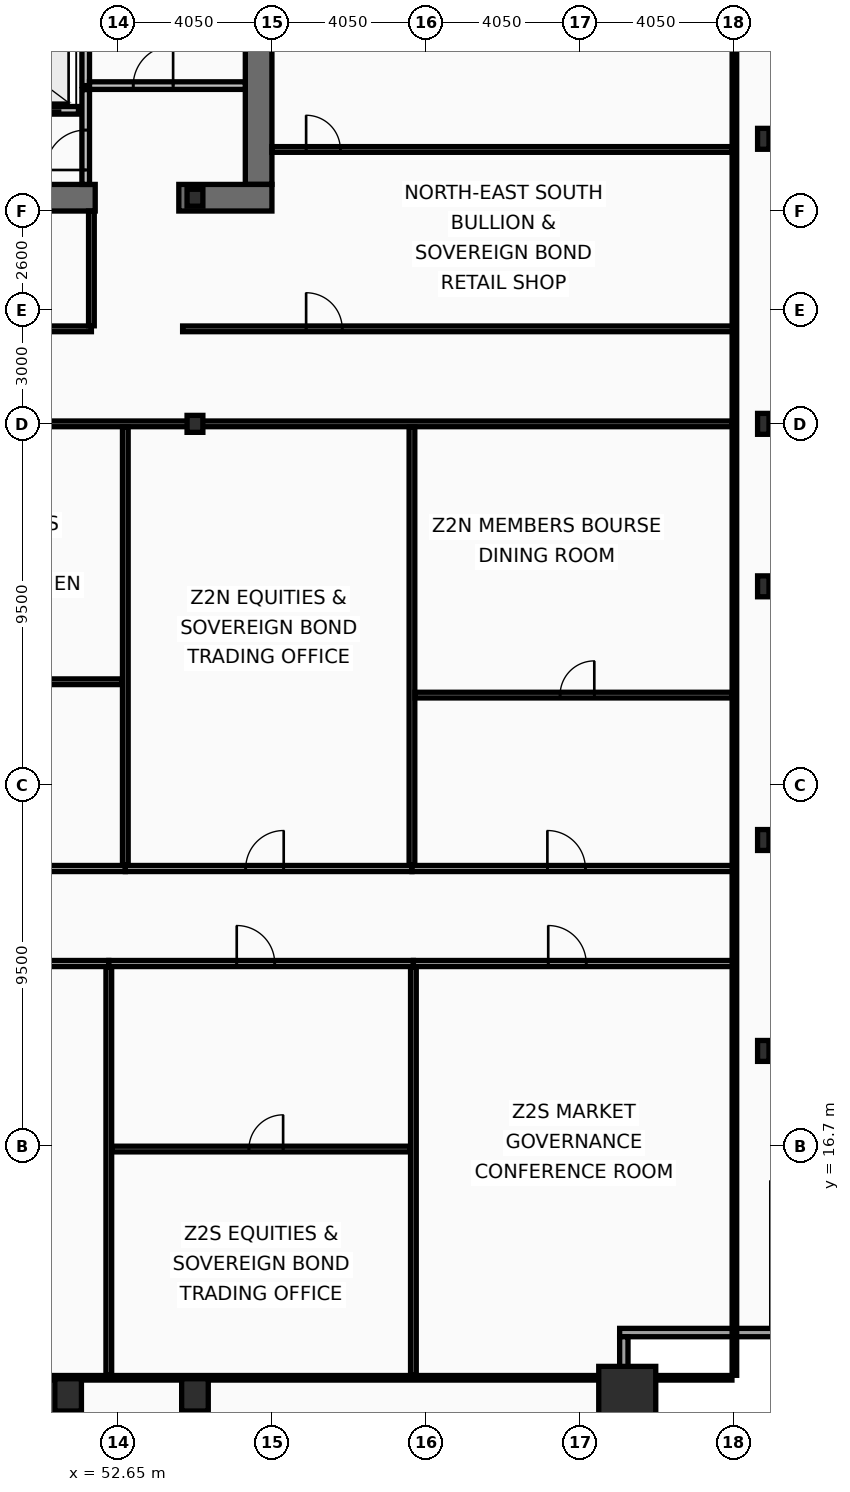
"""IFC4 building model, lengths in metres.
Left out: names, types, materials, properties, quantities, classifications, styles, units other than length and angle.
Written with IfcOpenShell. Run it as: python <this file> out.ifc"""

import sys

from ifc_helpers import new_model, si_unit, direction, frame, frame_2d, origin, origin_2d, place, context, subcontext, project, spatial, rectangle, hollow_rectangle, i_section, extrude, element, fill, save


model = new_model("IFC4")
c1 = context("Model", 3, precision=1e-05, world=origin(), true_north=direction((0.0, 1.0)))
c2 = subcontext(c1, "Body", "Model", "MODEL_VIEW")
j1 = project(units=[si_unit("LENGTHUNIT", "METRE"), si_unit("PLANEANGLEUNIT", "RADIAN")], contexts=[c1])
p1 = place(None, origin())
s1 = spatial("IfcSite", under=j1, at=p1, CompositionType="ELEMENT")
p2 = place(p1, origin())
s2 = spatial("IfcBuilding", under=s1, at=p2, CompositionType="ELEMENT")
p3 = place(p2, frame((0.0, 0.0, 125.4)))
s3 = spatial("IfcBuildingStorey", under=s2, at=p3, CompositionType="ELEMENT", Elevation=125.4)
p4 = place(p3, frame((56.35, 53.0, 0.0), z_axis=(0.0, 0.0, 1.0), x_axis=(0.0, -1.0, 0.0)))
e1 = element("IfcWall", 1, at=p4, inside=s3, PredefinedType="SHEAR", context=c2, shape_type="SweptSolid", body=[
    extrude(rectangle(XDim=11.0, YDim=0.7, at=frame_2d((5.5, 0.0))), origin(), (0.0, 0.0, 1.0), 3.44),
])
p5 = place(p3, frame((52.05, 41.65, 0.0), z_axis=(0.0, 0.0, 1.0), x_axis=(-1.0, 0.0, 0.0)))
e2 = element("IfcWall", 2, at=p5, inside=s3, PredefinedType="SHEAR", context=c2, shape_type="SweptSolid", body=[
    extrude(rectangle(XDim=11.3, YDim=0.7, at=frame_2d((5.65, 0.0))), origin(), (0.0, 0.0, 1.0), 3.44),
])
p6 = place(p3, frame((56.7, 41.65, 0.0), z_axis=(0.0, 0.0, 1.0), x_axis=(-1.0, 0.0, 0.0)))
e3 = element("IfcWall", 3, at=p6, inside=s3, PredefinedType="SHEAR", context=c2, shape_type="SweptSolid", body=[
    extrude(rectangle(XDim=2.45, YDim=0.7, at=frame_2d((1.225, 0.0))), origin(), (0.0, 0.0, 1.0), 3.44),
])
p7 = place(p3, frame((66.05, 10.15, 0.0), z_axis=(0.0, 0.0, 1.0), x_axis=(1.0, 0.0, 0.0)))
e4 = element("IfcColumn", 4, at=p7, inside=s3, PredefinedType="COLUMN", context=c2, shape_type="SweptSolid", body=[
    extrude(hollow_rectangle(XDim=1.5, YDim=1.5, WallThickness=0.07, at=origin_2d()), origin(), (0.0, 0.0, 1.0), 3.6),
])
for number, where, z_axis, x_axis in (
    (5, (51.337, 10.15, 0.0), (0.0, 0.0, 1.0), (1.0, 0.0, 0.0)),
    (6, (54.675, 10.15, 0.0), (0.0, 0.0, 1.0), (1.0, 0.0, 0.0)),
):
    element("IfcColumn", number, at=place(p3, frame(where, z_axis=z_axis, x_axis=x_axis)), inside=s3, PredefinedType="COLUMN", context=c2, shape_type="SweptSolid", body=[
        extrude(hollow_rectangle(XDim=0.7, YDim=0.85, WallThickness=0.05, at=origin_2d()), origin(), (0.0, 0.0, 1.0), 3.6),
    ])
for number, where, z_axis, x_axis in (
    (7, (69.63, 19.2, 0.0), (0.0, 0.0, 1.0), (1.0, 0.0, 0.0)),
    (8, (69.63, 24.75, 0.0), (0.0, 0.0, 1.0), (1.0, 0.0, 0.0)),
    (9, (69.63, 31.425, 0.0), (0.0, 0.0, 1.0), (1.0, 0.0, 0.0)),
    (10, (69.63, 35.7, 0.0), (0.0, 0.0, 1.0), (1.0, 0.0, 0.0)),
    (11, (69.63, 43.2, 0.0), (0.0, 0.0, 1.0), (1.0, 0.0, 0.0)),
):
    element("IfcColumn", number, at=place(p3, frame(where, z_axis=z_axis, x_axis=x_axis)), inside=s3, PredefinedType="COLUMN", context=c2, shape_type="SweptSolid", body=[
        extrude(i_section(OverallWidth=0.3, OverallDepth=0.55, WebThickness=0.015, FlangeThickness=0.029, at=origin_2d()), origin(), (0.0, 0.0, 1.0), 3.6),
    ])
for number, where, z_axis, x_axis in (
    (12, (54.675, 35.7, 0.0), (0.0, 0.0, 1.0), (1.0, 0.0, 0.0)),
    (13, (54.675, 41.65, 0.0), (0.0, 0.0, 1.0), (1.0, 0.0, 0.0)),
):
    element("IfcColumn", number, at=place(p3, frame(where, z_axis=z_axis, x_axis=x_axis)), inside=s3, PredefinedType="COLUMN", context=c2, shape_type="SweptSolid", body=[
        extrude(i_section(OverallWidth=0.416, OverallDepth=0.446, WebThickness=0.039, FlangeThickness=0.063, at=origin_2d()), origin(), (0.0, 0.0, 1.0), 3.6),
    ])
p8 = place(p3, frame((70.07, 11.79, 0.0), z_axis=(0.0, 0.0, 1.0), x_axis=(-1.0, 0.0, 0.0)))
e14 = element("IfcWall", 14, at=p8, inside=s3, PredefinedType="SOLIDWALL", context=c2, shape_type="SweptSolid", body=[
    extrude(rectangle(XDim=4.22, YDim=0.22, at=frame_2d((2.11, 0.0))), origin(), (0.0, 0.0, 1.0), 2.83),
])
p9 = place(p3, frame((65.96, 11.68, 0.0), z_axis=(0.0, 0.0, 1.0), x_axis=(0.0, -1.0, 0.0)))
e15 = element("IfcWall", 15, at=p9, inside=s3, PredefinedType="SOLIDWALL", context=c2, shape_type="SweptSolid", body=[
    extrude(rectangle(XDim=3.91, YDim=0.22, at=frame_2d((1.955, 0.0))), origin(), (0.0, 0.0, 1.0), 2.83),
])
p10 = place(p3, frame((51.61, 43.95, 0.0), z_axis=(0.0, 0.0, 1.0), x_axis=(-1.0, 0.0, 0.0)))
e16 = element("IfcWall", 16, at=p10, inside=s3, PredefinedType="PARTITIONING", context=c2, shape_type="SweptSolid", body=[
    extrude(rectangle(XDim=2.92, YDim=0.2, at=frame_2d((1.46, 0.0))), origin(), (0.0, 0.0, 1.0), 3.44),
])
p11 = place(p10, frame((0.81, 0.0, 0.0)))
e17 = element("IfcOpeningElement", 17, at=p11, cuts=e16, PredefinedType="OPENING", context=c2, shape_type="SweptSolid", body=[
    extrude(rectangle(XDim=1.3, YDim=2.18, at=frame_2d((0.65, 1.09))), frame((0.0, 0.11, 0.0), z_axis=(0.0, -1.0, 0.0), x_axis=(1.0, 0.0, 0.0)), (0.0, 0.0, 1.0), 0.22),
])
p12 = place(p3, frame((51.8, 44.6, 0.0), z_axis=(0.0, 0.0, 1.0), x_axis=(0.0, 1.0, 0.0)))
e18 = element("IfcWall", 18, at=p12, inside=s3, PredefinedType="PARTITIONING", context=c2, shape_type="SweptSolid", body=[
    extrude(rectangle(XDim=4.3, YDim=0.2, at=frame_2d((2.15, 0.0))), origin(), (0.0, 0.0, 1.0), 3.44),
])
p13 = place(p3, frame((51.9, 44.6, 0.0), z_axis=(0.0, 0.0, 1.0), x_axis=(1.0, 0.0, 0.0)))
e19 = element("IfcWall", 19, at=p13, inside=s3, PredefinedType="PARTITIONING", context=c2, shape_type="SweptSolid", body=[
    extrude(rectangle(XDim=4.1, YDim=0.2, at=frame_2d((2.05, 0.0))), origin(), (0.0, 0.0, 1.0), 3.44),
])
p14 = place(p13, frame((1.15, 0.0, 0.0)))
e20 = element("IfcOpeningElement", 20, at=p14, cuts=e19, PredefinedType="OPENING", context=c2, shape_type="SweptSolid", body=[
    extrude(rectangle(XDim=1.05, YDim=2.15, at=frame_2d((0.525, 1.075))), frame((0.0, 0.11, 0.0), z_axis=(0.0, -1.0, 0.0), x_axis=(1.0, 0.0, 0.0)), (0.0, 0.0, 1.0), 0.22),
])
p15 = place(p3, frame((51.8, 42.0, 0.0), z_axis=(0.0, 0.0, 1.0), x_axis=(0.0, 1.0, 0.0)))
e21 = element("IfcWall", 21, at=p15, inside=s3, PredefinedType="PARTITIONING", context=c2, shape_type="SweptSolid", body=[
    extrude(rectangle(XDim=2.495, YDim=0.2, at=frame_2d((1.248, 0.0))), origin(), (0.0, 0.0, 1.0), 3.44),
])
p16 = place(p15, frame((0.38, 0.0, 0.0)))
e22 = element("IfcOpeningElement", 22, at=p16, cuts=e21, PredefinedType="OPENING", context=c2, shape_type="SweptSolid", body=[
    extrude(rectangle(XDim=1.05, YDim=2.15, at=frame_2d((0.525, 1.075))), frame((0.0, 0.11, 0.0), z_axis=(0.0, -1.0, 0.0), x_axis=(1.0, 0.0, 0.0)), (0.0, 0.0, 1.0), 0.22),
])
p17 = place(p3, frame((46.3, 38.2, 0.0), z_axis=(0.0, 0.0, 1.0), x_axis=(1.0, 0.0, 0.0)))
e23 = element("IfcWall", 23, at=p17, inside=s3, PredefinedType="PARTITIONING", context=c2, shape_type="SweptSolid", body=[
    extrude(rectangle(XDim=5.65, YDim=0.15, at=frame_2d((2.825, 0.0))), origin(), (0.0, 0.0, 1.0), 2.73),
])
p18 = place(p17, frame((1.1, 0.0, 0.0)))
e24 = element("IfcOpeningElement", 24, at=p18, cuts=e23, PredefinedType="OPENING", context=c2, shape_type="SweptSolid", body=[
    extrude(rectangle(XDim=1.0, YDim=2.05, at=frame_2d((0.5, 1.025))), frame((0.0, 0.085, 0.0), z_axis=(0.0, -1.0, 0.0), x_axis=(1.0, 0.0, 0.0)), (0.0, 0.0, 1.0), 0.17),
])
p19 = place(p3, frame((51.95, 38.28, 0.0), z_axis=(0.0, 0.0, 1.0), x_axis=(0.0, 1.0, 0.0)))
e25 = element("IfcWall", 25, at=p19, inside=s3, PredefinedType="PARTITIONING", context=c2, shape_type="SweptSolid", body=[
    extrude(rectangle(XDim=3.02, YDim=0.15, at=frame_2d((1.51, 0.0))), origin(), (0.0, 0.0, 1.0), 3.44),
])
p20 = place(p3, frame((54.35, 38.2, 0.0), z_axis=(0.0, 0.0, 1.0), x_axis=(1.0, 0.0, 0.0)))
e26 = element("IfcWall", 26, at=p20, inside=s3, PredefinedType="PARTITIONING", context=c2, shape_type="SweptSolid", body=[
    extrude(rectangle(XDim=14.52, YDim=0.15, at=frame_2d((7.26, 0.0))), origin(), (0.0, 0.0, 1.0), 2.73),
])
p21 = place(p20, frame((3.25, 0.0, 0.0)))
e27 = element("IfcOpeningElement", 27, at=p21, cuts=e26, PredefinedType="OPENING", context=c2, shape_type="SweptSolid", body=[
    extrude(rectangle(XDim=0.95, YDim=2.05, at=frame_2d((0.475, 1.025))), frame((0.0, 0.085, 0.0), z_axis=(0.0, -1.0, 0.0), x_axis=(1.0, 0.0, 0.0)), (0.0, 0.0, 1.0), 0.17),
])
p22 = place(p3, frame((56.7, 42.92, 0.0), z_axis=(0.0, 0.0, 1.0), x_axis=(1.0, 0.0, 0.0)))
e28 = element("IfcWall", 28, at=p22, inside=s3, PredefinedType="PARTITIONING", context=c2, shape_type="SweptSolid", body=[
    extrude(rectangle(XDim=12.105, YDim=0.15, at=frame_2d((6.052, 0.0))), origin(), (0.0, 0.0, 1.0), 2.73),
])
p23 = place(p22, frame((0.9, 0.0, 0.0)))
e29 = element("IfcOpeningElement", 29, at=p23, cuts=e28, PredefinedType="OPENING", context=c2, shape_type="SweptSolid", body=[
    extrude(rectangle(XDim=0.9, YDim=2.05, at=frame_2d((0.45, 1.025))), frame((0.0, 0.085, 0.0), z_axis=(0.0, -1.0, 0.0), x_axis=(1.0, 0.0, 0.0)), (0.0, 0.0, 1.0), 0.17),
])
p24 = place(p3, frame((35.645, 21.5, 0.0), z_axis=(0.0, 0.0, 1.0), x_axis=(1.0, 0.0, 0.0)))
e30 = element("IfcWall", 30, at=p24, inside=s3, PredefinedType="PARTITIONING", context=c2, shape_type="SweptSolid", body=[
    extrude(rectangle(XDim=16.763, YDim=0.16, at=frame_2d((8.382, 0.0))), origin(), (0.0, 0.0, 1.0), 2.73),
])
p25 = place(p24, frame((7.041, 0.0, 0.0)))
e31 = element("IfcOpeningElement", 31, at=p25, cuts=e30, PredefinedType="OPENING", context=c2, shape_type="SweptSolid", body=[
    extrude(rectangle(XDim=1.6, YDim=2.15, at=frame_2d((0.8, 1.075))), frame((0.0, 0.09, 0.0), z_axis=(0.0, -1.0, 0.0), x_axis=(1.0, 0.0, 0.0)), (0.0, 0.0, 1.0), 0.18),
])
p26 = place(p3, frame((52.408, 21.5, 0.0), z_axis=(0.0, 0.0, 1.0), x_axis=(1.0, 0.0, 0.0)))
e32 = element("IfcWall", 32, at=p26, inside=s3, PredefinedType="PARTITIONING", context=c2, shape_type="SweptSolid", body=[
    extrude(rectangle(XDim=8.015, YDim=0.16, at=frame_2d((4.007, 0.0))), origin(), (0.0, 0.0, 1.0), 2.73),
])
p27 = place(p26, frame((3.366, 0.0, 0.0)))
e33 = element("IfcOpeningElement", 33, at=p27, cuts=e32, PredefinedType="OPENING", context=c2, shape_type="SweptSolid", body=[
    extrude(rectangle(XDim=1.0, YDim=2.05, at=frame_2d((0.5, 1.025))), frame((0.0, 0.09, 0.0), z_axis=(0.0, -1.0, 0.0), x_axis=(1.0, 0.0, 0.0)), (0.0, 0.0, 1.0), 0.18),
])
p28 = place(p3, frame((52.408, 10.665, 0.0), z_axis=(0.0, 0.0, 1.0), x_axis=(0.0, 1.0, 0.0)))
e34 = element("IfcWall", 34, at=p28, inside=s3, PredefinedType="PARTITIONING", context=c2, shape_type="SweptSolid", body=[
    extrude(rectangle(XDim=10.75, YDim=0.15, at=frame_2d((5.375, 0.0))), origin(), (0.0, 0.0, 1.0), 2.88),
])
p29 = place(p3, frame((52.488, 16.619, 0.0), z_axis=(0.0, 0.0, 1.0), x_axis=(1.0, 0.0, 0.0)))
e35 = element("IfcWall", 35, at=p29, inside=s3, PredefinedType="PARTITIONING", context=c2, shape_type="SweptSolid", body=[
    extrude(rectangle(XDim=7.855, YDim=0.15, at=frame_2d((3.928, 0.0))), origin(), (0.0, 0.0, 1.0), 2.73),
])
p30 = place(p29, frame((3.607, 0.0, 0.0)))
e36 = element("IfcOpeningElement", 36, at=p30, cuts=e35, PredefinedType="OPENING", context=c2, shape_type="SweptSolid", body=[
    extrude(rectangle(XDim=0.9, YDim=2.05, at=frame_2d((0.45, 1.025))), frame((0.0, 0.085, 0.0), z_axis=(0.0, -1.0, 0.0), x_axis=(1.0, 0.0, 0.0)), (0.0, 0.0, 1.0), 0.17),
])
p31 = place(p3, frame((60.423, 21.5, 0.0), z_axis=(0.0, 0.0, 1.0), x_axis=(1.0, 0.0, 0.0)))
e37 = element("IfcWall", 37, at=p31, inside=s3, PredefinedType="PARTITIONING", context=c2, shape_type="SweptSolid", body=[
    extrude(rectangle(XDim=8.447, YDim=0.16, at=frame_2d((4.224, 0.0))), origin(), (0.0, 0.0, 1.0), 3.44),
])
p32 = place(p31, frame((3.548, 0.0, 0.0)))
e38 = element("IfcOpeningElement", 38, at=p32, cuts=e37, PredefinedType="OPENING", context=c2, shape_type="SweptSolid", body=[
    extrude(rectangle(XDim=1.0, YDim=2.05, at=frame_2d((0.5, 1.025))), frame((0.0, 0.09, 0.0), z_axis=(0.0, -1.0, 0.0), x_axis=(1.0, 0.0, 0.0)), (0.0, 0.0, 1.0), 0.18),
])
p33 = place(p3, frame((60.423, 10.665, 0.0), z_axis=(0.0, 0.0, 1.0), x_axis=(0.0, 1.0, 0.0)))
e39 = element("IfcWall", 39, at=p33, inside=s3, PredefinedType="PARTITIONING", context=c2, shape_type="SweptSolid", body=[
    extrude(rectangle(XDim=10.75, YDim=0.15, at=frame_2d((5.375, 0.0))), origin(), (0.0, 0.0, 1.0), 2.73),
])
p34 = place(p3, frame((21.81, 35.7, 0.0), z_axis=(0.0, 0.0, 1.0), x_axis=(1.0, 0.0, 0.0)))
e40 = element("IfcWall", 40, at=p34, inside=s3, PredefinedType="PARTITIONING", context=c2, shape_type="SweptSolid", body=[
    extrude(rectangle(XDim=46.995, YDim=0.15, at=frame_2d((23.498, 0.0))), origin(), (0.0, 0.0, 1.0), 2.73),
])
p35 = place(p3, frame((38.229, 24.0, 0.0), z_axis=(0.0, 0.0, 1.0), x_axis=(1.0, 0.0, 0.0)))
e41 = element("IfcWall", 41, at=p35, inside=s3, PredefinedType="PARTITIONING", context=c2, shape_type="SweptSolid", body=[
    extrude(rectangle(XDim=14.613, YDim=0.16, at=frame_2d((7.307, 0.0))), origin(), (0.0, 0.0, 1.0), 2.73),
])
p36 = place(p35, frame((6.138, 0.0, 0.0)))
e42 = element("IfcOpeningElement", 42, at=p36, cuts=e41, PredefinedType="OPENING", context=c2, shape_type="SweptSolid", body=[
    extrude(rectangle(XDim=1.6, YDim=2.15, at=frame_2d((0.8, 1.075))), frame((0.0, 0.09, 0.0), z_axis=(0.0, -1.0, 0.0), x_axis=(1.0, 0.0, 0.0)), (0.0, 0.0, 1.0), 0.18),
])
p37 = place(p3, frame((38.309, 28.914, 0.0), z_axis=(0.0, 0.0, 1.0), x_axis=(1.0, 0.0, 0.0)))
e43 = element("IfcWall", 43, at=p37, inside=s3, PredefinedType="PARTITIONING", context=c2, shape_type="SweptSolid", body=[
    extrude(rectangle(XDim=14.453, YDim=0.15, at=frame_2d((7.227, 0.0))), origin(), (0.0, 0.0, 1.0), 2.73),
])
p38 = place(p37, frame((6.576, 0.0, 0.0)))
e44 = element("IfcOpeningElement", 44, at=p38, cuts=e43, PredefinedType="OPENING", context=c2, shape_type="SweptSolid", body=[
    extrude(rectangle(XDim=0.9, YDim=2.05, at=frame_2d((0.45, 1.025))), frame((0.0, 0.085, 0.0), z_axis=(0.0, -1.0, 0.0), x_axis=(1.0, 0.0, 0.0)), (0.0, 0.0, 1.0), 0.17),
])
p39 = place(p3, frame((52.842, 24.0, 0.0), z_axis=(0.0, 0.0, 1.0), x_axis=(1.0, 0.0, 0.0)))
e45 = element("IfcWall", 45, at=p39, inside=s3, PredefinedType="PARTITIONING", context=c2, shape_type="SweptSolid", body=[
    extrude(rectangle(XDim=7.542, YDim=0.16, at=frame_2d((3.771, 0.0))), origin(), (0.0, 0.0, 1.0), 2.73),
])
p40 = place(p39, frame((3.168, 0.0, 0.0)))
e46 = element("IfcOpeningElement", 46, at=p40, cuts=e45, PredefinedType="OPENING", context=c2, shape_type="SweptSolid", body=[
    extrude(rectangle(XDim=1.0, YDim=2.05, at=frame_2d((0.5, 1.025))), frame((0.0, 0.09, 0.0), z_axis=(0.0, -1.0, 0.0), x_axis=(1.0, 0.0, 0.0)), (0.0, 0.0, 1.0), 0.18),
])
p41 = place(p3, frame((52.842, 24.085, 0.0), z_axis=(0.0, 0.0, 1.0), x_axis=(0.0, 1.0, 0.0)))
e47 = element("IfcWall", 47, at=p41, inside=s3, PredefinedType="PARTITIONING", context=c2, shape_type="SweptSolid", body=[
    extrude(rectangle(XDim=11.535, YDim=0.15, at=frame_2d((5.768, 0.0))), origin(), (0.0, 0.0, 1.0), 2.88),
])
p42 = place(p3, frame((60.385, 24.0, 0.0), z_axis=(0.0, 0.0, 1.0), x_axis=(1.0, 0.0, 0.0)))
e48 = element("IfcWall", 48, at=p42, inside=s3, PredefinedType="PARTITIONING", context=c2, shape_type="SweptSolid", body=[
    extrude(rectangle(XDim=8.485, YDim=0.16, at=frame_2d((4.243, 0.0))), origin(), (0.0, 0.0, 1.0), 3.44),
])
p43 = place(p42, frame((3.564, 0.0, 0.0)))
e49 = element("IfcOpeningElement", 49, at=p43, cuts=e48, PredefinedType="OPENING", context=c2, shape_type="SweptSolid", body=[
    extrude(rectangle(XDim=1.0, YDim=2.05, at=frame_2d((0.5, 1.025))), frame((0.0, 0.09, 0.0), z_axis=(0.0, -1.0, 0.0), x_axis=(1.0, 0.0, 0.0)), (0.0, 0.0, 1.0), 0.18),
])
p44 = place(p3, frame((60.385, 24.085, 0.0), z_axis=(0.0, 0.0, 1.0), x_axis=(0.0, 1.0, 0.0)))
e50 = element("IfcWall", 50, at=p44, inside=s3, PredefinedType="PARTITIONING", context=c2, shape_type="SweptSolid", body=[
    extrude(rectangle(XDim=11.535, YDim=0.15, at=frame_2d((5.768, 0.0))), origin(), (0.0, 0.0, 1.0), 2.73),
])
p45 = place(p3, frame((60.465, 28.563, 0.0), z_axis=(0.0, 0.0, 1.0), x_axis=(1.0, 0.0, 0.0)))
e51 = element("IfcWall", 51, at=p45, inside=s3, PredefinedType="PARTITIONING", context=c2, shape_type="SweptSolid", body=[
    extrude(rectangle(XDim=8.34, YDim=0.15, at=frame_2d((4.17, 0.0))), origin(), (0.0, 0.0, 1.0), 3.44),
])
p46 = place(p45, frame((3.818, 0.0, 0.0)))
e52 = element("IfcOpeningElement", 52, at=p46, cuts=e51, PredefinedType="OPENING", context=c2, shape_type="SweptSolid", body=[
    extrude(rectangle(XDim=0.9, YDim=2.05, at=frame_2d((0.45, 1.025))), frame((0.0, 0.085, 0.0), z_axis=(0.0, -1.0, 0.0), x_axis=(1.0, 0.0, 0.0)), (0.0, 0.0, 1.0), 0.17),
])
p47 = place(p3, frame((68.87, 10.665, 0.0), z_axis=(0.0, 0.0, 1.0), x_axis=(0.0, 1.0, 0.0)))
e53 = element("IfcWall", 53, at=p47, inside=s3, PredefinedType="PARTITIONING", context=c2, shape_type="SweptSolid", body=[
    extrude(rectangle(XDim=42.11, YDim=0.12, at=frame_2d((21.055, 0.0))), origin(), (0.0, 0.0, 1.0), 2.73),
])
p48 = place(p3, frame((4.095, 10.6, 0.0), z_axis=(0.0, 0.0, 1.0), x_axis=(1.0, 0.0, 0.0)))
e54 = element("IfcWall", 54, at=p48, inside=s3, PredefinedType="PARTITIONING", context=c2, shape_type="SweptSolid", body=[
    extrude(rectangle(XDim=64.71, YDim=0.12, at=frame_2d((32.355, 0.0))), origin(), (0.0, 0.0, 1.0), 2.73),
])
p49 = place(p14, origin())
e55 = element("IfcDoor", 55, at=p49, inside=s3, OperationType="SINGLE_SWING_RIGHT", PredefinedType="DOOR", context=c2, shape_type="SweptSolid", body=[
    extrude(rectangle(XDim=1.05, YDim=2.15, at=frame_2d((0.525, 1.075))), frame((0.0, 0.025, 0.0), z_axis=(0.0, -1.0, 0.0), x_axis=(1.0, 0.0, 0.0)), (0.0, 0.0, 1.0), 0.05),
])
fill(e20, e55)
p50 = place(p16, origin())
e56 = element("IfcDoor", 56, at=p50, inside=s3, OperationType="SINGLE_SWING_LEFT", PredefinedType="DOOR", context=c2, shape_type="SweptSolid", body=[
    extrude(rectangle(XDim=1.05, YDim=2.15, at=frame_2d((0.525, 1.075))), frame((0.0, 0.025, 0.0), z_axis=(0.0, -1.0, 0.0), x_axis=(1.0, 0.0, 0.0)), (0.0, 0.0, 1.0), 0.05),
])
fill(e22, e56)
p51 = place(p21, origin())
e57 = element("IfcDoor", 57, at=p51, inside=s3, OperationType="SINGLE_SWING_LEFT", PredefinedType="DOOR", context=c2, shape_type="SweptSolid", body=[
    extrude(rectangle(XDim=0.95, YDim=2.05, at=frame_2d((0.475, 1.025))), frame((0.0, 0.025, 0.0), z_axis=(0.0, -1.0, 0.0), x_axis=(1.0, 0.0, 0.0)), (0.0, 0.0, 1.0), 0.05),
])
fill(e27, e57)
p52 = place(p23, origin())
e58 = element("IfcDoor", 58, at=p52, inside=s3, OperationType="SINGLE_SWING_LEFT", PredefinedType="DOOR", context=c2, shape_type="SweptSolid", body=[
    extrude(rectangle(XDim=0.9, YDim=2.05, at=frame_2d((0.45, 1.025))), frame((0.0, 0.025, 0.0), z_axis=(0.0, -1.0, 0.0), x_axis=(1.0, 0.0, 0.0)), (0.0, 0.0, 1.0), 0.05),
])
fill(e29, e58)
p53 = place(p27, origin())
e59 = element("IfcDoor", 59, at=p53, inside=s3, OperationType="SINGLE_SWING_LEFT", PredefinedType="DOOR", context=c2, shape_type="SweptSolid", body=[
    extrude(rectangle(XDim=1.0, YDim=2.05, at=frame_2d((0.5, 1.025))), frame((0.0, 0.025, 0.0), z_axis=(0.0, -1.0, 0.0), x_axis=(1.0, 0.0, 0.0)), (0.0, 0.0, 1.0), 0.05),
])
fill(e33, e59)
p54 = place(p30, origin())
e60 = element("IfcDoor", 60, at=p54, inside=s3, OperationType="SINGLE_SWING_RIGHT", PredefinedType="DOOR", context=c2, shape_type="SweptSolid", body=[
    extrude(rectangle(XDim=0.9, YDim=2.05, at=frame_2d((0.45, 1.025))), frame((0.0, 0.025, 0.0), z_axis=(0.0, -1.0, 0.0), x_axis=(1.0, 0.0, 0.0)), (0.0, 0.0, 1.0), 0.05),
])
fill(e36, e60)
p55 = place(p32, origin())
e61 = element("IfcDoor", 61, at=p55, inside=s3, OperationType="SINGLE_SWING_LEFT", PredefinedType="DOOR", context=c2, shape_type="SweptSolid", body=[
    extrude(rectangle(XDim=1.0, YDim=2.05, at=frame_2d((0.5, 1.025))), frame((0.0, 0.025, 0.0), z_axis=(0.0, -1.0, 0.0), x_axis=(1.0, 0.0, 0.0)), (0.0, 0.0, 1.0), 0.05),
])
fill(e38, e61)
p56 = place(p40, origin())
e62 = element("IfcDoor", 62, at=p56, inside=s3, OperationType="SINGLE_SWING_RIGHT", PredefinedType="DOOR", context=c2, shape_type="SweptSolid", body=[
    extrude(rectangle(XDim=1.0, YDim=2.05, at=frame_2d((0.5, 1.025))), frame((0.0, 0.025, 0.0), z_axis=(0.0, -1.0, 0.0), x_axis=(1.0, 0.0, 0.0)), (0.0, 0.0, 1.0), 0.05),
])
fill(e46, e62)
p57 = place(p43, origin())
e63 = element("IfcDoor", 63, at=p57, inside=s3, OperationType="SINGLE_SWING_LEFT", PredefinedType="DOOR", context=c2, shape_type="SweptSolid", body=[
    extrude(rectangle(XDim=1.0, YDim=2.05, at=frame_2d((0.5, 1.025))), frame((0.0, 0.025, 0.0), z_axis=(0.0, -1.0, 0.0), x_axis=(1.0, 0.0, 0.0)), (0.0, 0.0, 1.0), 0.05),
])
fill(e49, e63)
p58 = place(p46, origin())
e64 = element("IfcDoor", 64, at=p58, inside=s3, OperationType="SINGLE_SWING_RIGHT", PredefinedType="DOOR", context=c2, shape_type="SweptSolid", body=[
    extrude(rectangle(XDim=0.9, YDim=2.05, at=frame_2d((0.45, 1.025))), frame((0.0, 0.025, 0.0), z_axis=(0.0, -1.0, 0.0), x_axis=(1.0, 0.0, 0.0)), (0.0, 0.0, 1.0), 0.05),
])
fill(e52, e64)
save(model, sys.argv[1])
